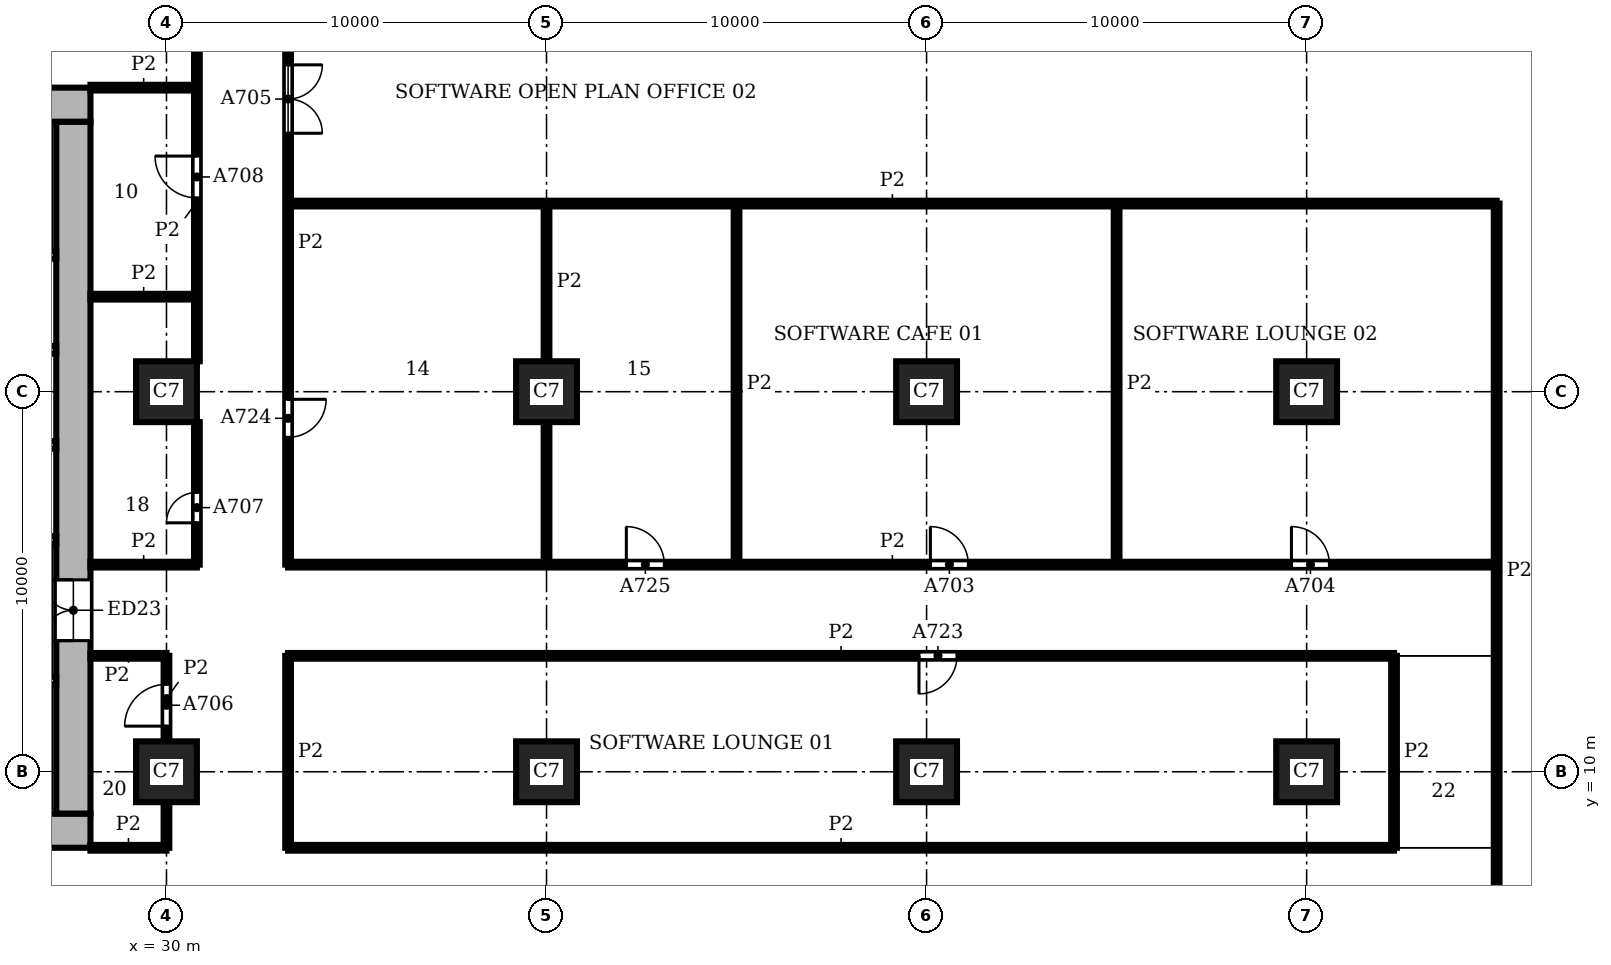
"""IFC4 building model, lengths in metres.
Left out: names, types, materials, properties, quantities, classifications, styles, units other than length and angle.
Written with IfcOpenShell. Run it as: python <this file> out.ifc"""

import sys

from ifc_helpers import new_model, si_unit, direction, frame, frame_2d, origin, origin_2d, place, context, subcontext, project, spatial, rectangle, extrude, element, fill, save


model = new_model("IFC4")
c1 = context("Model", 3, precision=1e-05, world=origin(), true_north=direction((0.0, 1.0)))
c2 = subcontext(c1, "Body", "Model", "MODEL_VIEW")
j1 = project(units=[si_unit("LENGTHUNIT", "METRE"), si_unit("PLANEANGLEUNIT", "RADIAN")], contexts=[c1])
p1 = place(None, origin())
s1 = spatial("IfcSite", under=j1, at=p1, CompositionType="ELEMENT")
p2 = place(p1, origin())
s2 = spatial("IfcBuilding", under=s1, at=p2, CompositionType="ELEMENT")
p3 = place(p2, frame((0.0, 0.0, 82.2)))
s3 = spatial("IfcBuildingStorey", under=s2, at=p3, CompositionType="ELEMENT", Elevation=82.2)
for number, where, z_axis, x_axis in (
    (1, (30.0, 10.0, 0.0), (0.0, 0.0, 1.0), (1.0, 0.0, 0.0)),
    (2, (30.0, 20.0, 0.0), (0.0, 0.0, 1.0), (1.0, 0.0, 0.0)),
    (3, (40.0, 10.0, 0.0), (0.0, 0.0, 1.0), (1.0, 0.0, 0.0)),
    (4, (40.0, 20.0, 0.0), (0.0, 0.0, 1.0), (1.0, 0.0, 0.0)),
    (5, (50.0, 10.0, 0.0), (0.0, 0.0, 1.0), (1.0, 0.0, 0.0)),
    (6, (50.0, 20.0, 0.0), (0.0, 0.0, 1.0), (1.0, 0.0, 0.0)),
    (7, (60.0, 10.0, 0.0), (0.0, 0.0, 1.0), (1.0, 0.0, 0.0)),
    (8, (60.0, 20.0, 0.0), (0.0, 0.0, 1.0), (1.0, 0.0, 0.0)),
):
    element("IfcColumn", number, at=place(p3, frame(where, z_axis=z_axis, x_axis=x_axis)), inside=s3, PredefinedType="COLUMN", context=c2, shape_type="SweptSolid", body=[
        extrude(rectangle(XDim=1.6, YDim=1.6, at=origin_2d()), origin(), (0.0, 0.0, 1.0), 3.9),
    ])
p4 = place(p3, frame((8.0, 8.45, 0.0), z_axis=(0.0, 0.0, 1.0), x_axis=(1.0, 0.0, 0.0)))
e9 = element("IfcWall", 9, at=p4, inside=s3, PredefinedType="SHEAR", context=c2, shape_type="SweptSolid", body=[
    extrude(rectangle(XDim=20.0, YDim=0.9, at=frame_2d((10.0, 0.0))), origin(), (0.0, 0.0, 1.0), 3.9),
])
p5 = place(p3, frame((27.55, 8.9, 0.0), z_axis=(0.0, 0.0, 1.0), x_axis=(0.0, 1.0, 0.0)))
e10 = element("IfcWall", 10, at=p5, inside=s3, PredefinedType="SHEAR", context=c2, shape_type="SweptSolid", body=[
    extrude(rectangle(XDim=18.2, YDim=0.9, at=frame_2d((9.1, 0.0))), origin(), (0.0, 0.0, 1.0), 3.9),
])
p6 = place(p5, frame((4.55, 0.0, 0.0)))
e11 = element("IfcOpeningElement", 11, at=p6, cuts=e10, PredefinedType="OPENING", context=c2, shape_type="SweptSolid", body=[
    extrude(rectangle(XDim=1.6, YDim=2.1, at=frame_2d((0.8, 1.05))), frame((0.0, 0.46, 0.0), z_axis=(0.0, -1.0, 0.0), x_axis=(1.0, 0.0, 0.0)), (0.0, 0.0, 1.0), 0.92),
])
p7 = place(p3, frame((28.0, 27.55, 0.0), z_axis=(0.0, 0.0, 1.0), x_axis=(-1.0, 0.0, 0.0)))
e12 = element("IfcWall", 12, at=p7, inside=s3, PredefinedType="SHEAR", context=c2, shape_type="SweptSolid", body=[
    extrude(rectangle(XDim=20.0, YDim=0.9, at=frame_2d((10.0, 0.0))), origin(), (0.0, 0.0, 1.0), 3.9),
])
p8 = place(p3, frame((13.8, 12.4, 0.0), z_axis=(0.0, 0.0, 1.0), x_axis=(1.0, 0.0, 0.0)))
e13 = element("IfcWall", 13, at=p8, inside=s3, PredefinedType="SHEAR", context=c2, shape_type="SweptSolid", body=[
    extrude(rectangle(XDim=13.3, YDim=0.2, at=frame_2d((6.65, 0.0))), origin(), (0.0, 0.0, 1.0), 3.58),
])
p9 = place(p8, frame((2.4, 0.0, 0.0)))
e14 = element("IfcOpeningElement", 14, at=p9, cuts=e13, PredefinedType="OPENING", context=c2, shape_type="SweptSolid", body=[
    extrude(rectangle(XDim=1.1, YDim=2.1, at=frame_2d((0.55, 1.05))), frame((0.0, 0.11, 0.0), z_axis=(0.0, -1.0, 0.0), x_axis=(1.0, 0.0, 0.0)), (0.0, 0.0, 1.0), 0.22),
])
p10 = place(p8, frame((4.9, 0.0, 0.0)))
e15 = element("IfcOpeningElement", 15, at=p10, cuts=e13, PredefinedType="OPENING", context=c2, shape_type="SweptSolid", body=[
    extrude(rectangle(XDim=1.1, YDim=2.1, at=frame_2d((0.55, 1.05))), frame((0.0, 0.11, 0.0), z_axis=(0.0, -1.0, 0.0), x_axis=(1.0, 0.0, 0.0)), (0.0, 0.0, 1.0), 0.22),
])
p11 = place(p8, frame((0.25, 0.0, 0.0)))
e16 = element("IfcOpeningElement", 16, at=p11, cuts=e13, PredefinedType="OPENING", context=c2, shape_type="SweptSolid", body=[
    extrude(rectangle(XDim=1.0, YDim=2.1, at=frame_2d((0.5, 1.05))), frame((0.0, 0.11, 0.0), z_axis=(0.0, -1.0, 0.0), x_axis=(1.0, 0.0, 0.0)), (0.0, 0.0, 1.0), 0.22),
])
for number, where, z_axis, x_axis in (
    (17, (24.3, 16.1, 0.0), (0.0, 0.0, 1.0), (1.0, 0.0, 0.0)),
    (18, (24.3, 18.6, 0.0), (0.0, 0.0, 1.0), (1.0, 0.0, 0.0)),
    (19, (24.3, 21.1, 0.0), (0.0, 0.0, 1.0), (1.0, 0.0, 0.0)),
):
    element("IfcWall", number, at=place(p3, frame(where, z_axis=z_axis, x_axis=x_axis)), inside=s3, PredefinedType="SHEAR", context=c2, shape_type="SweptSolid", body=[
        extrude(rectangle(XDim=2.8, YDim=0.2, at=frame_2d((1.4, 0.0))), origin(), (0.0, 0.0, 1.0), 3.58),
    ])
p12 = place(p3, frame((13.8, 23.6, 0.0), z_axis=(0.0, 0.0, 1.0), x_axis=(1.0, 0.0, 0.0)))
e20 = element("IfcWall", 20, at=p12, inside=s3, PredefinedType="SHEAR", context=c2, shape_type="SweptSolid", body=[
    extrude(rectangle(XDim=13.3, YDim=0.2, at=frame_2d((6.65, 0.0))), origin(), (0.0, 0.0, 1.0), 3.58),
])
p13 = place(p12, frame((2.4, 0.0, 0.0)))
e21 = element("IfcOpeningElement", 21, at=p13, cuts=e20, PredefinedType="OPENING", context=c2, shape_type="SweptSolid", body=[
    extrude(rectangle(XDim=1.1, YDim=2.1, at=frame_2d((0.55, 1.05))), frame((0.0, 0.11, 0.0), z_axis=(0.0, -1.0, 0.0), x_axis=(1.0, 0.0, 0.0)), (0.0, 0.0, 1.0), 0.22),
])
p14 = place(p12, frame((4.9, 0.0, 0.0)))
e22 = element("IfcOpeningElement", 22, at=p14, cuts=e20, PredefinedType="OPENING", context=c2, shape_type="SweptSolid", body=[
    extrude(rectangle(XDim=1.1, YDim=2.1, at=frame_2d((0.55, 1.05))), frame((0.0, 0.11, 0.0), z_axis=(0.0, -1.0, 0.0), x_axis=(1.0, 0.0, 0.0)), (0.0, 0.0, 1.0), 0.22),
])
p15 = place(p12, frame((0.25, 0.0, 0.0)))
e23 = element("IfcOpeningElement", 23, at=p15, cuts=e20, PredefinedType="OPENING", context=c2, shape_type="SweptSolid", body=[
    extrude(rectangle(XDim=1.0, YDim=2.1, at=frame_2d((0.5, 1.05))), frame((0.0, 0.11, 0.0), z_axis=(0.0, -1.0, 0.0), x_axis=(1.0, 0.0, 0.0)), (0.0, 0.0, 1.0), 0.22),
])
p16 = place(p3, frame((30.0, 8.0, 0.0), z_axis=(0.0, 0.0, 1.0), x_axis=(0.0, 1.0, 0.0)))
e24 = element("IfcWall", 24, at=p16, inside=s3, PredefinedType="PARTITIONING", context=c2, shape_type="SweptSolid", body=[
    extrude(rectangle(XDim=1.2, YDim=0.15, at=frame_2d((0.6, 0.0))), origin(), (0.0, 0.0, 1.0), 3.58),
])
p17 = place(p3, frame((30.0, 10.8, 0.0), z_axis=(0.0, 0.0, 1.0), x_axis=(0.0, 1.0, 0.0)))
e25 = element("IfcWall", 25, at=p17, inside=s3, PredefinedType="PARTITIONING", context=c2, shape_type="SweptSolid", body=[
    extrude(rectangle(XDim=2.25, YDim=0.15, at=frame_2d((1.125, 0.0))), origin(), (0.0, 0.0, 1.0), 3.58),
])
p18 = place(p17, frame((0.4, 0.0, 0.0)))
e26 = element("IfcOpeningElement", 26, at=p18, cuts=e25, PredefinedType="OPENING", context=c2, shape_type="SweptSolid", body=[
    extrude(rectangle(XDim=1.1, YDim=2.1, at=frame_2d((0.55, 1.05))), frame((0.0, 0.085, 0.0), z_axis=(0.0, -1.0, 0.0), x_axis=(1.0, 0.0, 0.0)), (0.0, 0.0, 1.0), 0.17),
])
p19 = place(p3, frame((30.8, 15.45, 0.0), z_axis=(0.0, 0.0, 1.0), x_axis=(0.0, 1.0, 0.0)))
e27 = element("IfcWall", 27, at=p19, inside=s3, PredefinedType="PARTITIONING", context=c2, shape_type="SweptSolid", body=[
    extrude(rectangle(XDim=3.75, YDim=0.15, at=frame_2d((1.875, 0.0))), origin(), (0.0, 0.0, 1.0), 3.58),
])
p20 = place(p19, frame((1.1, 0.0, 0.0)))
e28 = element("IfcOpeningElement", 28, at=p20, cuts=e27, PredefinedType="OPENING", context=c2, shape_type="SweptSolid", body=[
    extrude(rectangle(XDim=0.8, YDim=2.1, at=frame_2d((0.4, 1.05))), frame((0.0, 0.085, 0.0), z_axis=(0.0, -1.0, 0.0), x_axis=(1.0, 0.0, 0.0)), (0.0, 0.0, 1.0), 0.17),
])
p21 = place(p3, frame((30.8, 20.8, 0.0), z_axis=(0.0, 0.0, 1.0), x_axis=(0.0, 1.0, 0.0)))
e29 = element("IfcWall", 29, at=p21, inside=s3, PredefinedType="PARTITIONING", context=c2, shape_type="SweptSolid", body=[
    extrude(rectangle(XDim=8.4, YDim=0.15, at=frame_2d((4.2, 0.0))), origin(), (0.0, 0.0, 1.0), 3.58),
])
p22 = place(p21, frame((4.3, 0.0, 0.0)))
e30 = element("IfcOpeningElement", 30, at=p22, cuts=e29, PredefinedType="OPENING", context=c2, shape_type="SweptSolid", body=[
    extrude(rectangle(XDim=1.1, YDim=2.1, at=frame_2d((0.55, 1.05))), frame((0.0, 0.085, 0.0), z_axis=(0.0, -1.0, 0.0), x_axis=(1.0, 0.0, 0.0)), (0.0, 0.0, 1.0), 0.17),
])
p23 = place(p3, frame((33.2, 8.0, 0.0), z_axis=(0.0, 0.0, 1.0), x_axis=(0.0, 1.0, 0.0)))
e31 = element("IfcWall", 31, at=p23, inside=s3, PredefinedType="PARTITIONING", context=c2, shape_type="SweptSolid", body=[
    extrude(rectangle(XDim=5.05, YDim=0.15, at=frame_2d((2.525, 0.0))), origin(), (0.0, 0.0, 1.0), 3.58),
])
p24 = place(p3, frame((33.2, 15.45, 0.0), z_axis=(0.0, 0.0, 1.0), x_axis=(0.0, 1.0, 0.0)))
e32 = element("IfcWall", 32, at=p24, inside=s3, PredefinedType="PARTITIONING", context=c2, shape_type="SweptSolid", body=[
    extrude(rectangle(XDim=16.912, YDim=0.15, at=frame_2d((8.456, 0.0))), origin(), (0.0, 0.0, 1.0), 3.58),
])
p25 = place(p24, frame((11.35, 0.0, 0.0)))
e33 = element("IfcOpeningElement", 33, at=p25, cuts=e32, PredefinedType="OPENING", context=c2, shape_type="SweptSolid", body=[
    extrude(rectangle(XDim=1.8, YDim=2.1, at=frame_2d((0.9, 1.05))), frame((0.0, 0.085, 0.0), z_axis=(0.0, -1.0, 0.0), x_axis=(1.0, 0.0, 0.0)), (0.0, 0.0, 1.0), 0.17),
])
p26 = place(p24, frame((3.35, 0.0, 0.0)))
e34 = element("IfcOpeningElement", 34, at=p26, cuts=e32, PredefinedType="OPENING", context=c2, shape_type="SweptSolid", body=[
    extrude(rectangle(XDim=1.0, YDim=2.1, at=frame_2d((0.5, 1.05))), frame((0.0, 0.085, 0.0), z_axis=(0.0, -1.0, 0.0), x_axis=(1.0, 0.0, 0.0)), (0.0, 0.0, 1.0), 0.17),
])
p27 = place(p3, frame((40.0, 15.45, 0.0), z_axis=(0.0, 0.0, 1.0), x_axis=(0.0, 1.0, 0.0)))
e35 = element("IfcWall", 35, at=p27, inside=s3, PredefinedType="PARTITIONING", context=c2, shape_type="SweptSolid", body=[
    extrude(rectangle(XDim=3.75, YDim=0.15, at=frame_2d((1.875, 0.0))), origin(), (0.0, 0.0, 1.0), 3.58),
])
p28 = place(p3, frame((40.0, 20.8, 0.0), z_axis=(0.0, 0.0, 1.0), x_axis=(0.0, 1.0, 0.0)))
e36 = element("IfcWall", 36, at=p28, inside=s3, PredefinedType="PARTITIONING", context=c2, shape_type="SweptSolid", body=[
    extrude(rectangle(XDim=4.15, YDim=0.15, at=frame_2d((2.075, 0.0))), origin(), (0.0, 0.0, 1.0), 3.58),
])
for number, where, z_axis, x_axis in (
    (37, (45.0, 15.45, 0.0), (0.0, 0.0, 1.0), (0.0, 1.0, 0.0)),
    (38, (55.0, 15.45, 0.0), (0.0, 0.0, 1.0), (0.0, 1.0, 0.0)),
):
    element("IfcWall", number, at=place(p3, frame(where, z_axis=z_axis, x_axis=x_axis)), inside=s3, PredefinedType="PARTITIONING", context=c2, shape_type="SweptSolid", body=[
        extrude(rectangle(XDim=9.5, YDim=0.15, at=frame_2d((4.75, 0.0))), origin(), (0.0, 0.0, 1.0), 3.58),
    ])
p29 = place(p3, frame((62.3, 8.0, 0.0), z_axis=(0.0, 0.0, 1.0), x_axis=(0.0, 1.0, 0.0)))
e39 = element("IfcWall", 39, at=p29, inside=s3, PredefinedType="PARTITIONING", context=c2, shape_type="SweptSolid", body=[
    extrude(rectangle(XDim=5.05, YDim=0.15, at=frame_2d((2.525, 0.0))), origin(), (0.0, 0.0, 1.0), 3.58),
])
p30 = place(p3, frame((65.0, 5.6, 0.0), z_axis=(0.0, 0.0, 1.0), x_axis=(0.0, 1.0, 0.0)))
e40 = element("IfcWall", 40, at=p30, inside=s3, PredefinedType="PARTITIONING", context=c2, shape_type="SweptSolid", body=[
    extrude(rectangle(XDim=19.35, YDim=0.15, at=frame_2d((9.675, 0.0))), origin(), (0.0, 0.0, 1.0), 3.58),
])
p31 = place(p3, frame((28.0, 8.0, 0.0), z_axis=(0.0, 0.0, 1.0), x_axis=(1.0, 0.0, 0.0)))
e41 = element("IfcWall", 41, at=p31, inside=s3, PredefinedType="PARTITIONING", context=c2, shape_type="SweptSolid", body=[
    extrude(rectangle(XDim=2.0, YDim=0.15, at=frame_2d((1.0, 0.0))), origin(), (0.0, 0.0, 1.0), 3.58),
])
p32 = place(p3, frame((33.2, 8.0, 0.0), z_axis=(0.0, 0.0, 1.0), x_axis=(1.0, 0.0, 0.0)))
e42 = element("IfcWall", 42, at=p32, inside=s3, PredefinedType="PARTITIONING", context=c2, shape_type="SweptSolid", body=[
    extrude(rectangle(XDim=29.1, YDim=0.15, at=frame_2d((14.55, 0.0))), origin(), (0.0, 0.0, 1.0), 3.58),
])
p33 = place(p3, frame((28.0, 13.05, 0.0), z_axis=(0.0, 0.0, 1.0), x_axis=(1.0, 0.0, 0.0)))
e43 = element("IfcWall", 43, at=p33, inside=s3, PredefinedType="PARTITIONING", context=c2, shape_type="SweptSolid", body=[
    extrude(rectangle(XDim=2.0, YDim=0.15, at=frame_2d((1.0, 0.0))), origin(), (0.0, 0.0, 1.0), 3.58),
])
p34 = place(p3, frame((33.2, 13.05, 0.0), z_axis=(0.0, 0.0, 1.0), x_axis=(1.0, 0.0, 0.0)))
e44 = element("IfcWall", 44, at=p34, inside=s3, PredefinedType="PARTITIONING", context=c2, shape_type="SweptSolid", body=[
    extrude(rectangle(XDim=29.1, YDim=0.15, at=frame_2d((14.55, 0.0))), origin(), (0.0, 0.0, 1.0), 3.58),
])
p35 = place(p34, frame((16.6, 0.0, 0.0)))
e45 = element("IfcOpeningElement", 45, at=p35, cuts=e44, PredefinedType="OPENING", context=c2, shape_type="SweptSolid", body=[
    extrude(rectangle(XDim=1.0, YDim=2.1, at=frame_2d((0.5, 1.05))), frame((0.0, 0.085, 0.0), z_axis=(0.0, -1.0, 0.0), x_axis=(1.0, 0.0, 0.0)), (0.0, 0.0, 1.0), 0.17),
])
p36 = place(p3, frame((28.0, 15.45, 0.0), z_axis=(0.0, 0.0, 1.0), x_axis=(1.0, 0.0, 0.0)))
e46 = element("IfcWall", 46, at=p36, inside=s3, PredefinedType="PARTITIONING", context=c2, shape_type="SweptSolid", body=[
    extrude(rectangle(XDim=2.8, YDim=0.15, at=frame_2d((1.4, 0.0))), origin(), (0.0, 0.0, 1.0), 3.58),
])
p37 = place(p3, frame((33.2, 15.45, 0.0), z_axis=(0.0, 0.0, 1.0), x_axis=(1.0, 0.0, 0.0)))
e47 = element("IfcWall", 47, at=p37, inside=s3, PredefinedType="PARTITIONING", context=c2, shape_type="SweptSolid", body=[
    extrude(rectangle(XDim=31.8, YDim=0.15, at=frame_2d((15.9, 0.0))), origin(), (0.0, 0.0, 1.0), 3.58),
])
p38 = place(p37, frame((16.9, 0.0, 0.0)))
e48 = element("IfcOpeningElement", 48, at=p38, cuts=e47, PredefinedType="OPENING", context=c2, shape_type="SweptSolid", body=[
    extrude(rectangle(XDim=1.0, YDim=2.1, at=frame_2d((0.5, 1.05))), frame((0.0, 0.085, 0.0), z_axis=(0.0, -1.0, 0.0), x_axis=(1.0, 0.0, 0.0)), (0.0, 0.0, 1.0), 0.17),
])
p39 = place(p37, frame((26.4, 0.0, 0.0)))
e49 = element("IfcOpeningElement", 49, at=p39, cuts=e47, PredefinedType="OPENING", context=c2, shape_type="SweptSolid", body=[
    extrude(rectangle(XDim=1.0, YDim=2.1, at=frame_2d((0.5, 1.05))), frame((0.0, 0.085, 0.0), z_axis=(0.0, -1.0, 0.0), x_axis=(1.0, 0.0, 0.0)), (0.0, 0.0, 1.0), 0.17),
])
p40 = place(p37, frame((8.9, 0.0, 0.0)))
e50 = element("IfcOpeningElement", 50, at=p40, cuts=e47, PredefinedType="OPENING", context=c2, shape_type="SweptSolid", body=[
    extrude(rectangle(XDim=1.0, YDim=2.1, at=frame_2d((0.5, 1.05))), frame((0.0, 0.085, 0.0), z_axis=(0.0, -1.0, 0.0), x_axis=(1.0, 0.0, 0.0)), (0.0, 0.0, 1.0), 0.17),
])
p41 = place(p3, frame((28.0, 22.5, 0.0), z_axis=(0.0, 0.0, 1.0), x_axis=(1.0, 0.0, 0.0)))
e51 = element("IfcWall", 51, at=p41, inside=s3, PredefinedType="PARTITIONING", context=c2, shape_type="SweptSolid", body=[
    extrude(rectangle(XDim=2.8, YDim=0.15, at=frame_2d((1.4, 0.0))), origin(), (0.0, 0.0, 1.0), 3.58),
])
p42 = place(p3, frame((33.2, 24.95, 0.0), z_axis=(0.0, 0.0, 1.0), x_axis=(1.0, 0.0, 0.0)))
e52 = element("IfcWall", 52, at=p42, inside=s3, PredefinedType="PARTITIONING", context=c2, shape_type="SweptSolid", body=[
    extrude(rectangle(XDim=31.8, YDim=0.15, at=frame_2d((15.9, 0.0))), origin(), (0.0, 0.0, 1.0), 3.58),
])
p43 = place(p3, frame((28.0, 28.0, 0.0), z_axis=(0.0, 0.0, 1.0), x_axis=(1.0, 0.0, 0.0)))
e53 = element("IfcWall", 53, at=p43, inside=s3, PredefinedType="PARTITIONING", context=c2, shape_type="SweptSolid", body=[
    extrude(rectangle(XDim=2.8, YDim=0.15, at=frame_2d((1.4, 0.0))), origin(), (0.0, 0.0, 1.0), 3.58),
])
p44 = place(p6, origin())
e54 = element("IfcDoor", 54, at=p44, inside=s3, OperationType="DOUBLE_DOOR_SINGLE_SWING", PredefinedType="DOOR", context=c2, shape_type="SweptSolid", body=[
    extrude(rectangle(XDim=1.6, YDim=2.1, at=frame_2d((0.8, 1.05))), frame((0.0, 0.025, 0.0), z_axis=(0.0, -1.0, 0.0), x_axis=(1.0, 0.0, 0.0)), (0.0, 0.0, 1.0), 0.05),
])
fill(e11, e54)
p45 = place(p38, origin())
e55 = element("IfcDoor", 55, at=p45, inside=s3, OperationType="SINGLE_SWING_LEFT", PredefinedType="DOOR", context=c2, shape_type="SweptSolid", body=[
    extrude(rectangle(XDim=1.0, YDim=2.1, at=frame_2d((0.5, 1.05))), frame((0.0, 0.025, 0.0), z_axis=(0.0, -1.0, 0.0), x_axis=(1.0, 0.0, 0.0)), (0.0, 0.0, 1.0), 0.05),
])
fill(e48, e55)
p46 = place(p39, origin())
e56 = element("IfcDoor", 56, at=p46, inside=s3, OperationType="SINGLE_SWING_LEFT", PredefinedType="DOOR", context=c2, shape_type="SweptSolid", body=[
    extrude(rectangle(XDim=1.0, YDim=2.1, at=frame_2d((0.5, 1.05))), frame((0.0, 0.025, 0.0), z_axis=(0.0, -1.0, 0.0), x_axis=(1.0, 0.0, 0.0)), (0.0, 0.0, 1.0), 0.05),
])
fill(e49, e56)
p47 = place(p25, frame((1.8, 0.0, 0.0), z_axis=(0.0, 0.0, 1.0), x_axis=(-1.0, 0.0, 0.0)))
e57 = element("IfcDoor", 57, at=p47, inside=s3, OperationType="DOUBLE_DOOR_SINGLE_SWING", PredefinedType="DOOR", context=c2, shape_type="SweptSolid", body=[
    extrude(rectangle(XDim=1.8, YDim=2.1, at=frame_2d((0.9, 1.05))), frame((0.0, 0.025, 0.0), z_axis=(0.0, -1.0, 0.0), x_axis=(1.0, 0.0, 0.0)), (0.0, 0.0, 1.0), 0.05),
])
fill(e33, e57)
p48 = place(p18, origin())
e58 = element("IfcDoor", 58, at=p48, inside=s3, OperationType="SINGLE_SWING_LEFT", PredefinedType="DOOR", context=c2, shape_type="SweptSolid", body=[
    extrude(rectangle(XDim=1.1, YDim=2.1, at=frame_2d((0.55, 1.05))), frame((0.0, 0.025, 0.0), z_axis=(0.0, -1.0, 0.0), x_axis=(1.0, 0.0, 0.0)), (0.0, 0.0, 1.0), 0.05),
])
fill(e26, e58)
p49 = place(p20, origin())
e59 = element("IfcDoor", 59, at=p49, inside=s3, OperationType="SINGLE_SWING_LEFT", PredefinedType="DOOR", context=c2, shape_type="SweptSolid", body=[
    extrude(rectangle(XDim=0.8, YDim=2.1, at=frame_2d((0.4, 1.05))), frame((0.0, 0.025, 0.0), z_axis=(0.0, -1.0, 0.0), x_axis=(1.0, 0.0, 0.0)), (0.0, 0.0, 1.0), 0.05),
])
fill(e28, e59)
p50 = place(p22, origin())
e60 = element("IfcDoor", 60, at=p50, inside=s3, OperationType="SINGLE_SWING_RIGHT", PredefinedType="DOOR", context=c2, shape_type="SweptSolid", body=[
    extrude(rectangle(XDim=1.1, YDim=2.1, at=frame_2d((0.55, 1.05))), frame((0.0, 0.025, 0.0), z_axis=(0.0, -1.0, 0.0), x_axis=(1.0, 0.0, 0.0)), (0.0, 0.0, 1.0), 0.05),
])
fill(e30, e60)
p51 = place(p35, frame((1.0, 0.0, 0.0), z_axis=(0.0, 0.0, 1.0), x_axis=(-1.0, 0.0, 0.0)))
e61 = element("IfcDoor", 61, at=p51, inside=s3, OperationType="SINGLE_SWING_RIGHT", PredefinedType="DOOR", context=c2, shape_type="SweptSolid", body=[
    extrude(rectangle(XDim=1.0, YDim=2.1, at=frame_2d((0.5, 1.05))), frame((0.0, 0.025, 0.0), z_axis=(0.0, -1.0, 0.0), x_axis=(1.0, 0.0, 0.0)), (0.0, 0.0, 1.0), 0.05),
])
fill(e45, e61)
p52 = place(p26, frame((1.0, 0.0, 0.0), z_axis=(0.0, 0.0, 1.0), x_axis=(-1.0, 0.0, 0.0)))
e62 = element("IfcDoor", 62, at=p52, inside=s3, OperationType="SINGLE_SWING_LEFT", PredefinedType="DOOR", context=c2, shape_type="SweptSolid", body=[
    extrude(rectangle(XDim=1.0, YDim=2.1, at=frame_2d((0.5, 1.05))), frame((0.0, 0.025, 0.0), z_axis=(0.0, -1.0, 0.0), x_axis=(1.0, 0.0, 0.0)), (0.0, 0.0, 1.0), 0.05),
])
fill(e34, e62)
p53 = place(p40, origin())
e63 = element("IfcDoor", 63, at=p53, inside=s3, OperationType="SINGLE_SWING_LEFT", PredefinedType="DOOR", context=c2, shape_type="SweptSolid", body=[
    extrude(rectangle(XDim=1.0, YDim=2.1, at=frame_2d((0.5, 1.05))), frame((0.0, 0.025, 0.0), z_axis=(0.0, -1.0, 0.0), x_axis=(1.0, 0.0, 0.0)), (0.0, 0.0, 1.0), 0.05),
])
fill(e50, e63)
save(model, sys.argv[1])
